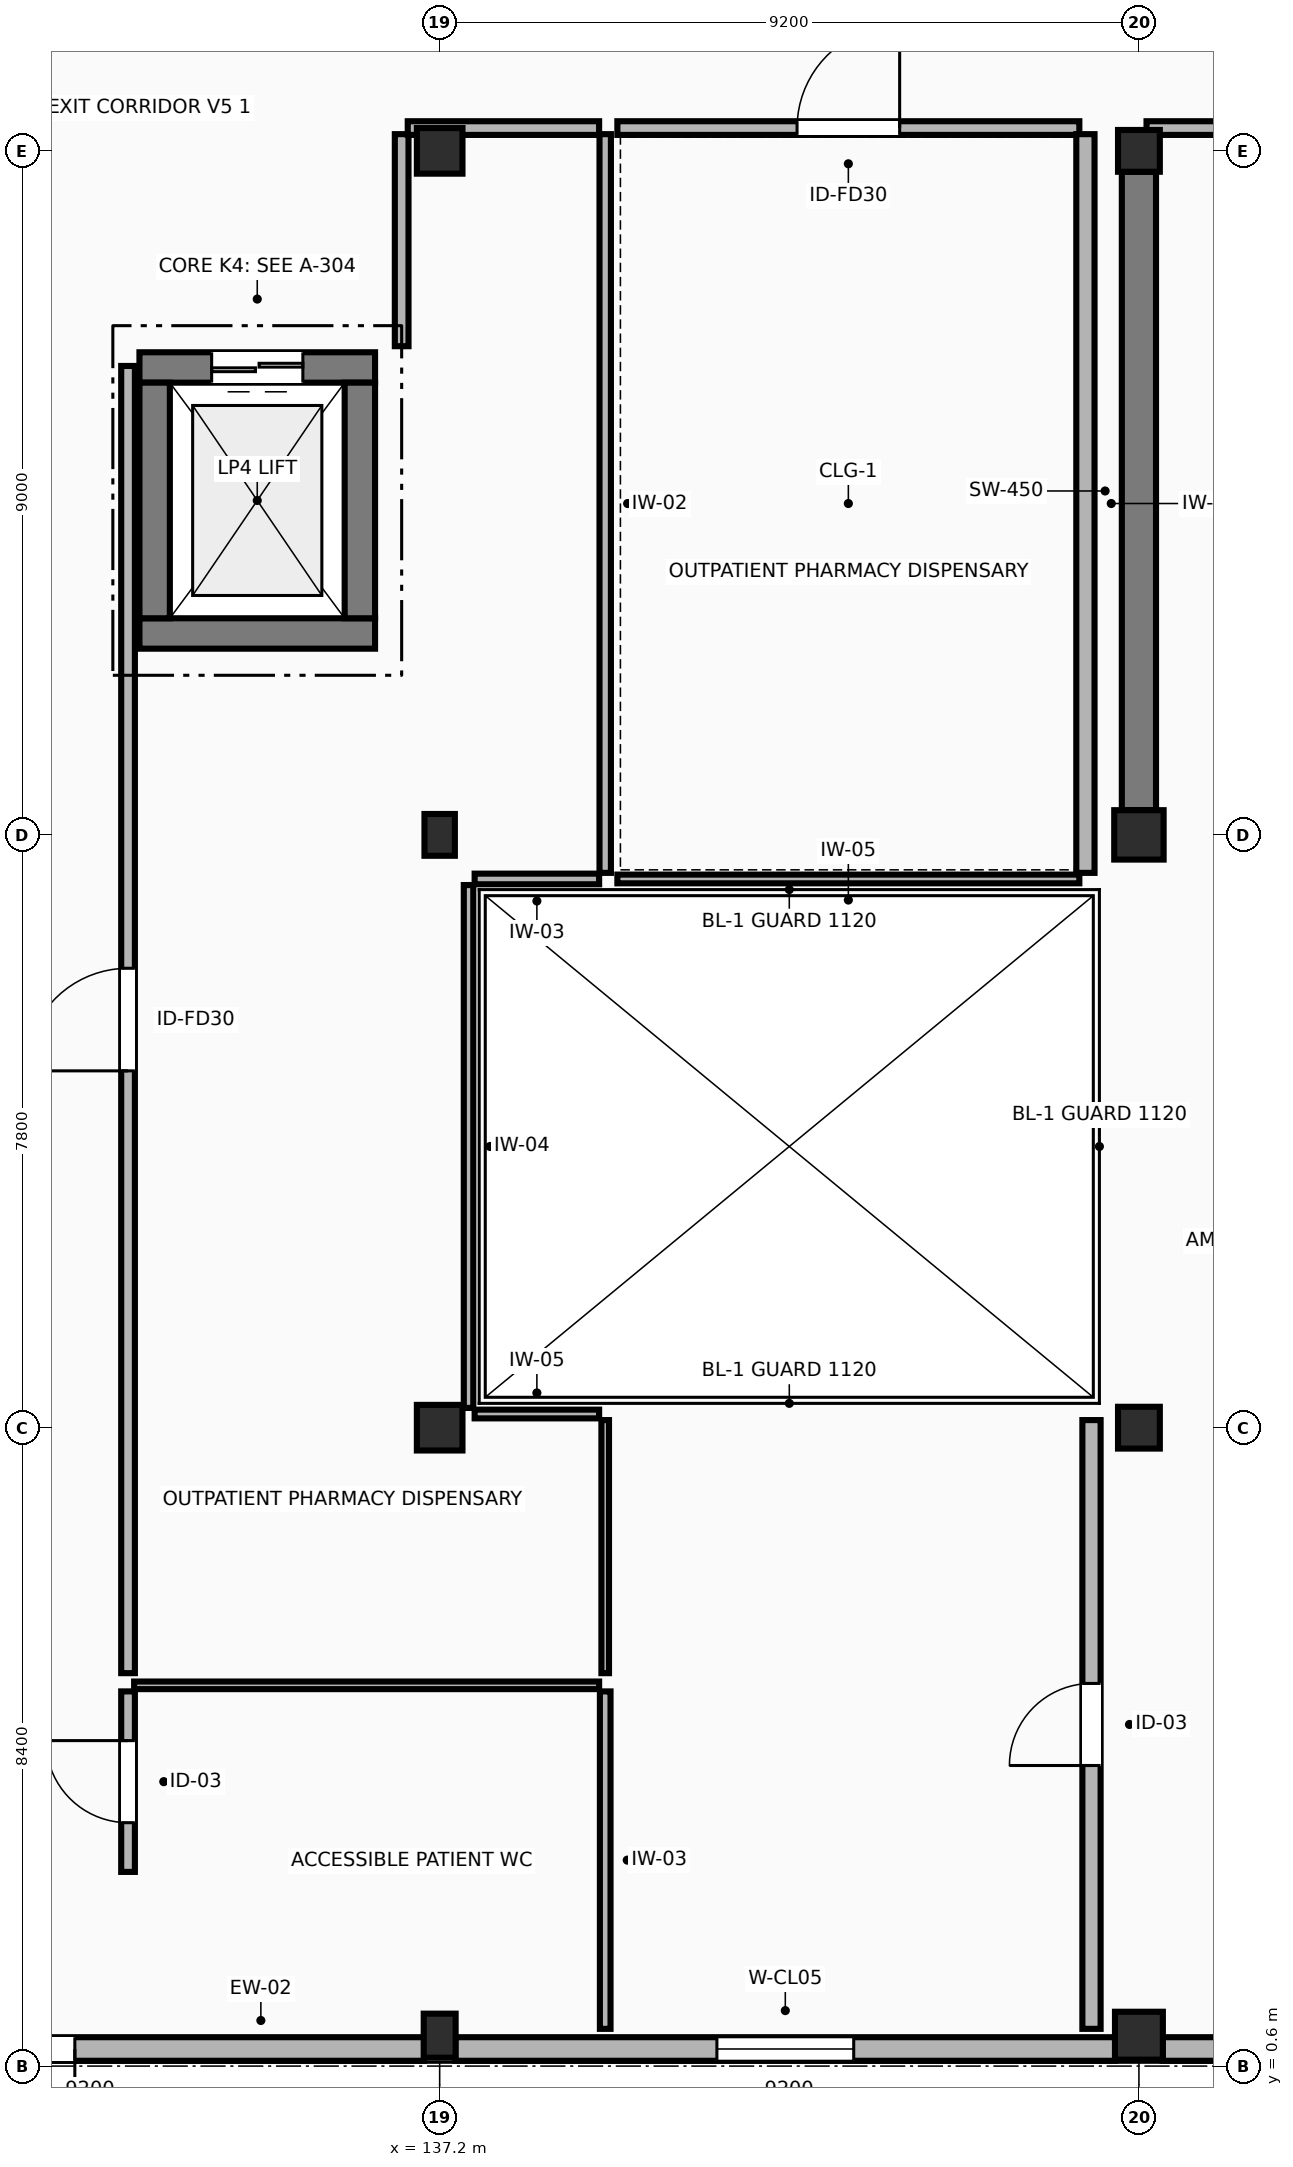
"""IFC4 building model, lengths in metres.
Left out: names, types, materials, properties, quantities, classifications, styles, units other than length and angle.
Written with IfcOpenShell. Run it as: python <this file> out.ifc"""

import sys

from ifc_helpers import new_model, si_unit, direction, frame, frame_2d, origin, origin_2d, place, context, subcontext, project, spatial, rectangle, extrude, element, fill, save


model = new_model("IFC4")
c1 = context("Model", 3, precision=1e-05, world=origin(), true_north=direction((0.0, 1.0)))
c2 = subcontext(c1, "Body", "Model", "MODEL_VIEW")
j1 = project(units=[si_unit("LENGTHUNIT", "METRE"), si_unit("PLANEANGLEUNIT", "RADIAN")], contexts=[c1])
p1 = place(None, origin())
s1 = spatial("IfcSite", under=j1, at=p1, CompositionType="ELEMENT")
p2 = place(p1, origin())
s2 = spatial("IfcBuilding", under=s1, at=p2, CompositionType="ELEMENT")
p3 = place(p2, origin())
s3 = spatial("IfcBuildingStorey", under=s2, at=p3, CompositionType="ELEMENT", Elevation=0.0)
p4 = place(p3, frame((137.2, 1.0, -1.75), z_axis=(0.0, 0.0, 1.0), x_axis=(1.0, 0.0, 0.0)))
e1 = element("IfcColumn", 1, at=p4, inside=s3, PredefinedType="COLUMN", context=c2, shape_type="SweptSolid", body=[
    extrude(rectangle(XDim=0.42, YDim=0.58, at=origin_2d()), origin(), (0.0, 0.0, 1.0), 7.15),
])
p5 = place(p3, frame((137.2, 9.0, -1.75), z_axis=(0.0, 0.0, 1.0), x_axis=(1.0, 0.0, 0.0)))
e2 = element("IfcColumn", 2, at=p5, inside=s3, PredefinedType="COLUMN", context=c2, shape_type="SweptSolid", body=[
    extrude(rectangle(XDim=0.6, YDim=0.6, at=origin_2d()), origin(), (0.0, 0.0, 1.0), 7.15),
])
p6 = place(p3, frame((137.2, 16.8, 0.0), z_axis=(0.0, 0.0, 1.0), x_axis=(1.0, 0.0, 0.0)))
e3 = element("IfcColumn", 3, at=p6, inside=s3, PredefinedType="COLUMN", context=c2, shape_type="SweptSolid", body=[
    extrude(rectangle(XDim=0.4, YDim=0.55, at=origin_2d()), origin(), (0.0, 0.0, 1.0), 5.4),
])
p7 = place(p3, frame((137.2, 25.8, 0.0), z_axis=(0.0, 0.0, 1.0), x_axis=(1.0, 0.0, 0.0)))
e4 = element("IfcColumn", 4, at=p7, inside=s3, PredefinedType="COLUMN", context=c2, shape_type="SweptSolid", body=[
    extrude(rectangle(XDim=0.6, YDim=0.6, at=origin_2d()), origin(), (0.0, 0.0, 1.0), 5.4),
])
p8 = place(p3, frame((146.4, 1.0, -1.75), z_axis=(0.0, 0.0, 1.0), x_axis=(1.0, 0.0, 0.0)))
e5 = element("IfcColumn", 5, at=p8, inside=s3, PredefinedType="COLUMN", context=c2, shape_type="SweptSolid", body=[
    extrude(rectangle(XDim=0.63, YDim=0.63, at=origin_2d()), origin(), (0.0, 0.0, 1.0), 7.15),
])
p9 = place(p3, frame((146.4, 9.0, -1.75), z_axis=(0.0, 0.0, 1.0), x_axis=(1.0, 0.0, 0.0)))
e6 = element("IfcColumn", 6, at=p9, inside=s3, PredefinedType="COLUMN", context=c2, shape_type="SweptSolid", body=[
    extrude(rectangle(XDim=0.55, YDim=0.55, at=origin_2d()), origin(), (0.0, 0.0, 1.0), 7.15),
])
p10 = place(p3, frame((146.4, 16.8, 0.0), z_axis=(0.0, 0.0, 1.0), x_axis=(1.0, 0.0, 0.0)))
e7 = element("IfcColumn", 7, at=p10, inside=s3, PredefinedType="COLUMN", context=c2, shape_type="SweptSolid", body=[
    extrude(rectangle(XDim=0.65, YDim=0.65, at=origin_2d()), origin(), (0.0, 0.0, 1.0), 5.4),
])
p11 = place(p3, frame((146.4, 25.8, 0.0), z_axis=(0.0, 0.0, 1.0), x_axis=(1.0, 0.0, 0.0)))
e8 = element("IfcColumn", 8, at=p11, inside=s3, PredefinedType="COLUMN", context=c2, shape_type="SweptSolid", body=[
    extrude(rectangle(XDim=0.55, YDim=0.55, at=origin_2d()), origin(), (0.0, 0.0, 1.0), 5.4),
])
p12 = place(p3, frame((128.26, 0.825, 0.0), z_axis=(0.0, 0.0, 1.0), x_axis=(1.0, 0.0, 0.0)))
e9 = element("IfcWall", 9, at=p12, inside=s3, PredefinedType="STANDARD", context=c2, shape_type="SweptSolid", body=[
    extrude(rectangle(XDim=8.735, YDim=0.31, at=frame_2d((4.368, 0.0))), origin(), (0.0, 0.0, 1.0), 4.42),
])
p13 = place(p12, frame((2.34, 0.0, 0.0)))
e10 = element("IfcOpeningElement", 10, at=p13, cuts=e9, PredefinedType="OPENING", context=c2, shape_type="SweptSolid", body=[
    extrude(rectangle(XDim=1.8, YDim=2.3, at=frame_2d((0.9, 1.15))), frame((0.0, 0.165, 0.0), z_axis=(0.0, -1.0, 0.0), x_axis=(1.0, 0.0, 0.0)), (0.0, 0.0, 1.0), 0.33),
])
p14 = place(p3, frame((137.405, 0.825, 0.0), z_axis=(0.0, 0.0, 1.0), x_axis=(1.0, 0.0, 0.0)))
e11 = element("IfcWall", 11, at=p14, inside=s3, PredefinedType="STANDARD", context=c2, shape_type="SweptSolid", body=[
    extrude(rectangle(XDim=8.685, YDim=0.31, at=frame_2d((4.343, 0.0))), origin(), (0.0, 0.0, 1.0), 4.42),
])
p15 = place(p14, frame((3.442, 0.0, 0.95)))
e12 = element("IfcOpeningElement", 12, at=p15, cuts=e11, PredefinedType="OPENING", context=c2, shape_type="SweptSolid", body=[
    extrude(rectangle(XDim=1.8, YDim=1.5, at=frame_2d((0.9, 0.75))), frame((0.0, 0.165, 0.0), z_axis=(0.0, -1.0, 0.0), x_axis=(1.0, 0.0, 0.0)), (0.0, 0.0, 1.0), 0.33),
])
p16 = place(p3, frame((146.71, 0.825, 0.0), z_axis=(0.0, 0.0, 1.0), x_axis=(1.0, 0.0, 0.0)))
e13 = element("IfcWall", 13, at=p16, inside=s3, PredefinedType="STANDARD", context=c2, shape_type="SweptSolid", body=[
    extrude(rectangle(XDim=8.805, YDim=0.31, at=frame_2d((4.402, 0.0))), origin(), (0.0, 0.0, 1.0), 4.42),
])
p17 = place(p16, frame((5.89, 0.0, 0.0)))
e14 = element("IfcOpeningElement", 14, at=p17, cuts=e13, PredefinedType="OPENING", context=c2, shape_type="SweptSolid", body=[
    extrude(rectangle(XDim=2.0, YDim=2.4, at=frame_2d((1.0, 1.2))), frame((0.0, 0.165, 0.0), z_axis=(0.0, -1.0, 0.0), x_axis=(1.0, 0.0, 0.0)), (0.0, 0.0, 1.0), 0.33),
])
p18 = place(p3, frame((133.25, 19.45, 0.0), z_axis=(0.0, 0.0, 1.0), x_axis=(1.0, 0.0, 0.0)))
e15 = element("IfcWall", 15, at=p18, inside=s3, PredefinedType="SHEAR", context=c2, shape_type="SweptSolid", body=[
    extrude(rectangle(XDim=3.1, YDim=0.4, at=frame_2d((1.55, 0.0))), origin(), (0.0, 0.0, 1.0), 5.4),
])
p19 = place(p3, frame((136.35, 22.95, 0.0), z_axis=(0.0, 0.0, 1.0), x_axis=(-1.0, 0.0, 0.0)))
e16 = element("IfcWall", 16, at=p19, inside=s3, PredefinedType="SHEAR", context=c2, shape_type="SweptSolid", body=[
    extrude(rectangle(XDim=3.1, YDim=0.4, at=frame_2d((1.55, 0.0))), origin(), (0.0, 0.0, 1.0), 5.4),
])
p20 = place(p19, frame((0.95, 0.0, 0.0)))
e17 = element("IfcOpeningElement", 17, at=p20, cuts=e16, PredefinedType="OPENING", context=c2, shape_type="SweptSolid", body=[
    extrude(rectangle(XDim=1.2, YDim=2.2, at=frame_2d((0.6, 1.1))), frame((0.0, 0.21, 0.0), z_axis=(0.0, -1.0, 0.0), x_axis=(1.0, 0.0, 0.0)), (0.0, 0.0, 1.0), 0.42),
])
for number, where, z_axis, x_axis in (
    (18, (133.45, 19.65, 0.0), (0.0, 0.0, 1.0), (0.0, 1.0, 0.0)),
    (19, (136.15, 22.75, 0.0), (0.0, 0.0, 1.0), (0.0, -1.0, 0.0)),
):
    element("IfcWall", number, at=place(p3, frame(where, z_axis=z_axis, x_axis=x_axis)), inside=s3, PredefinedType="SHEAR", context=c2, shape_type="SweptSolid", body=[
        extrude(rectangle(XDim=3.1, YDim=0.4, at=frame_2d((1.55, 0.0))), origin(), (0.0, 0.0, 1.0), 5.4),
    ])
p21 = place(p3, frame((146.4, 17.125, 0.0), z_axis=(0.0, 0.0, 1.0), x_axis=(0.0, 1.0, 0.0)))
e20 = element("IfcWall", 20, at=p21, inside=s3, PredefinedType="SHEAR", context=c2, shape_type="SweptSolid", body=[
    extrude(rectangle(XDim=8.4, YDim=0.45, at=frame_2d((4.2, 0.0))), origin(), (0.0, 0.0, 1.0), 5.1),
])
p22 = place(p3, frame((139.378, 5.53, 0.0), z_axis=(0.0, 0.0, 1.0), x_axis=(0.0, -1.0, 0.0)))
e21 = element("IfcWall", 21, at=p22, inside=s3, PredefinedType="PARTITIONING", context=c2, shape_type="SweptSolid", body=[
    extrude(rectangle(XDim=4.44, YDim=0.14, at=frame_2d((2.22, 0.0))), origin(), (0.0, 0.0, 1.0), 5.1),
])
p23 = place(p3, frame((133.1, 3.155, 0.0), z_axis=(0.0, 0.0, 1.0), x_axis=(0.0, 1.0, 0.0)))
e22 = element("IfcWall", 22, at=p23, inside=s3, PredefinedType="PARTITIONING", context=c2, shape_type="SweptSolid", body=[
    extrude(rectangle(XDim=2.375, YDim=0.18, at=frame_2d((1.188, 0.0))), origin(), (0.0, 0.0, 1.0), 5.1),
])
p24 = place(p23, frame((0.647, 0.0, 0.0)))
e23 = element("IfcOpeningElement", 23, at=p24, cuts=e22, PredefinedType="OPENING", context=c2, shape_type="SweptSolid", body=[
    extrude(rectangle(XDim=1.08, YDim=2.2, at=frame_2d((0.54, 1.1))), frame((0.0, 0.1, 0.0), z_axis=(0.0, -1.0, 0.0), x_axis=(1.0, 0.0, 0.0)), (0.0, 0.0, 1.0), 0.2),
])
p25 = place(p3, frame((133.18, 5.61, 0.0), z_axis=(0.0, 0.0, 1.0), x_axis=(1.0, 0.0, 0.0)))
e24 = element("IfcWall", 24, at=p25, inside=s3, PredefinedType="PARTITIONING", context=c2, shape_type="SweptSolid", body=[
    extrude(rectangle(XDim=6.118, YDim=0.1, at=frame_2d((3.059, 0.0))), origin(), (0.0, 0.0, 1.0), 5.1),
])
p26 = place(p3, frame((136.7, 23.23, 0.0), z_axis=(0.0, 0.0, 1.0), x_axis=(0.0, 1.0, 0.0)))
e25 = element("IfcWall", 25, at=p26, inside=s3, PredefinedType="PARTITIONING", context=c2, shape_type="SweptSolid", body=[
    extrude(rectangle(XDim=2.79, YDim=0.18, at=frame_2d((1.395, 0.0))), origin(), (0.0, 0.0, 1.0), 4.585),
])
p27 = place(p3, frame((136.78, 26.1, 0.0), z_axis=(0.0, 0.0, 1.0), x_axis=(1.0, 0.0, 0.0)))
e26 = element("IfcWall", 26, at=p27, inside=s3, PredefinedType="PARTITIONING", context=c2, shape_type="SweptSolid", body=[
    extrude(rectangle(XDim=2.518, YDim=0.18, at=frame_2d((1.259, 0.0))), origin(), (0.0, 0.0, 1.0), 4.435),
])
p28 = place(p3, frame((139.378, 26.02, 0.0), z_axis=(0.0, 0.0, 1.0), x_axis=(0.0, -1.0, 0.0)))
e27 = element("IfcWall", 27, at=p28, inside=s3, PredefinedType="PARTITIONING", context=c2, shape_type="SweptSolid", body=[
    extrude(rectangle(XDim=9.72, YDim=0.15, at=frame_2d((4.86, 0.0))), origin(), (0.0, 0.0, 1.0), 5.1),
])
p29 = place(p3, frame((139.298, 16.22, 0.0), z_axis=(0.0, 0.0, 1.0), x_axis=(-1.0, 0.0, 0.0)))
e28 = element("IfcWall", 28, at=p29, inside=s3, PredefinedType="PARTITIONING", context=c2, shape_type="SweptSolid", body=[
    extrude(rectangle(XDim=1.638, YDim=0.14, at=frame_2d((0.819, 0.0))), origin(), (0.0, 0.0, 1.0), 5.1),
])
p30 = place(p3, frame((137.58, 16.14, 0.0), z_axis=(0.0, 0.0, 1.0), x_axis=(0.0, -1.0, 0.0)))
e29 = element("IfcWall", 29, at=p30, inside=s3, PredefinedType="PARTITIONING", context=c2, shape_type="SweptSolid", body=[
    extrude(rectangle(XDim=6.88, YDim=0.125, at=frame_2d((3.44, 0.0))), origin(), (0.0, 0.0, 1.0), 4.61),
])
p31 = place(p3, frame((137.66, 9.18, 0.0), z_axis=(0.0, 0.0, 1.0), x_axis=(1.0, 0.0, 0.0)))
e30 = element("IfcWall", 30, at=p31, inside=s3, PredefinedType="PARTITIONING", context=c2, shape_type="SweptSolid", body=[
    extrude(rectangle(XDim=1.638, YDim=0.115, at=frame_2d((0.819, 0.0))), origin(), (0.0, 0.0, 1.0), 4.46),
])
p32 = place(p3, frame((139.378, 9.1, 0.0), z_axis=(0.0, 0.0, 1.0), x_axis=(0.0, -1.0, 0.0)))
e31 = element("IfcWall", 31, at=p32, inside=s3, PredefinedType="PARTITIONING", context=c2, shape_type="SweptSolid", body=[
    extrude(rectangle(XDim=3.33, YDim=0.1, at=frame_2d((1.665, 0.0))), origin(), (0.0, 0.0, 1.0), 5.1),
])
p33 = place(p3, frame((133.1, 5.77, 0.0), z_axis=(0.0, 0.0, 1.0), x_axis=(0.0, 1.0, 0.0)))
e32 = element("IfcWall", 32, at=p33, inside=s3, PredefinedType="PARTITIONING", context=c2, shape_type="SweptSolid", body=[
    extrude(rectangle(XDim=17.2, YDim=0.18, at=frame_2d((8.6, 0.0))), origin(), (0.0, 0.0, 1.0), 5.1),
])
p34 = place(p33, frame((7.925, 0.0, 0.0)))
e33 = element("IfcOpeningElement", 33, at=p34, cuts=e32, PredefinedType="OPENING", context=c2, shape_type="SweptSolid", body=[
    extrude(rectangle(XDim=1.35, YDim=2.2, at=frame_2d((0.675, 1.1))), frame((0.0, 0.1, 0.0), z_axis=(0.0, -1.0, 0.0), x_axis=(1.0, 0.0, 0.0)), (0.0, 0.0, 1.0), 0.2),
])
p35 = place(p3, frame((145.616, 16.22, 0.0), z_axis=(0.0, 0.0, 1.0), x_axis=(-1.0, 0.0, 0.0)))
e34 = element("IfcWall", 34, at=p35, inside=s3, PredefinedType="PARTITIONING", context=c2, shape_type="SweptSolid", body=[
    extrude(rectangle(XDim=6.078, YDim=0.115, at=frame_2d((3.039, 0.0))), origin(), (0.0, 0.0, 1.0), 5.1),
])
p36 = place(p3, frame((139.538, 26.1, 0.0), z_axis=(0.0, 0.0, 1.0), x_axis=(1.0, 0.0, 0.0)))
e35 = element("IfcWall", 35, at=p36, inside=s3, PredefinedType="PARTITIONING", context=c2, shape_type="SweptSolid", body=[
    extrude(rectangle(XDim=6.078, YDim=0.18, at=frame_2d((3.039, 0.0))), origin(), (0.0, 0.0, 1.0), 4.435),
])
p37 = place(p36, frame((2.364, 0.0, 0.0)))
e36 = element("IfcOpeningElement", 36, at=p37, cuts=e35, PredefinedType="OPENING", context=c2, shape_type="SweptSolid", body=[
    extrude(rectangle(XDim=1.35, YDim=2.2, at=frame_2d((0.675, 1.1))), frame((0.0, 0.1, 0.0), z_axis=(0.0, -1.0, 0.0), x_axis=(1.0, 0.0, 0.0)), (0.0, 0.0, 1.0), 0.2),
])
p38 = place(p3, frame((145.696, 26.02, 0.0), z_axis=(0.0, 0.0, 1.0), x_axis=(0.0, -1.0, 0.0)))
e37 = element("IfcWall", 37, at=p38, inside=s3, PredefinedType="PARTITIONING", context=c2, shape_type="SweptSolid", body=[
    extrude(rectangle(XDim=9.72, YDim=0.24, at=frame_2d((4.86, 0.0))), origin(), (0.0, 0.0, 1.0), 5.1),
])
p39 = place(p3, frame((145.776, 1.09, 0.0), z_axis=(0.0, 0.0, 1.0), x_axis=(0.0, 1.0, 0.0)))
e38 = element("IfcWall", 38, at=p39, inside=s3, PredefinedType="PARTITIONING", context=c2, shape_type="SweptSolid", body=[
    extrude(rectangle(XDim=8.01, YDim=0.24, at=frame_2d((4.005, 0.0))), origin(), (0.0, 0.0, 1.0), 5.1),
])
p40 = place(p39, frame((3.465, 0.0, 0.0)))
e39 = element("IfcOpeningElement", 39, at=p40, cuts=e38, PredefinedType="OPENING", context=c2, shape_type="SweptSolid", body=[
    extrude(rectangle(XDim=1.08, YDim=2.2, at=frame_2d((0.54, 1.1))), frame((0.0, 0.13, 0.0), z_axis=(0.0, -1.0, 0.0), x_axis=(1.0, 0.0, 0.0)), (0.0, 0.0, 1.0), 0.26),
])
p41 = place(p3, frame((146.5, 26.1, 0.0), z_axis=(0.0, 0.0, 1.0), x_axis=(1.0, 0.0, 0.0)))
e40 = element("IfcWall", 40, at=p41, inside=s3, PredefinedType="PARTITIONING", context=c2, shape_type="SweptSolid", body=[
    extrude(rectangle(XDim=5.434, YDim=0.18, at=frame_2d((2.717, 0.0))), origin(), (0.0, 0.0, 1.0), 4.435),
])
p42 = place(p41, frame((2.157, 0.0, 0.0)))
e41 = element("IfcOpeningElement", 41, at=p42, cuts=e40, PredefinedType="OPENING", context=c2, shape_type="SweptSolid", body=[
    extrude(rectangle(XDim=1.12, YDim=2.16, at=frame_2d((0.56, 1.08))), frame((0.0, 0.1, 0.0), z_axis=(0.0, -1.0, 0.0), x_axis=(1.0, 0.0, 0.0)), (0.0, 0.0, 1.0), 0.2),
])
p43 = place(p13, frame((1.8, 0.0, 0.0), z_axis=(0.0, 0.0, 1.0), x_axis=(-1.0, 0.0, 0.0)))
e42 = element("IfcDoor", 42, at=p43, inside=s3, OperationType="DOUBLE_DOOR_SINGLE_SWING", PredefinedType="DOOR", context=c2, shape_type="SweptSolid", body=[
    extrude(rectangle(XDim=1.8, YDim=2.3, at=frame_2d((0.9, 1.15))), frame((0.0, 0.025, 0.0), z_axis=(0.0, -1.0, 0.0), x_axis=(1.0, 0.0, 0.0)), (0.0, 0.0, 1.0), 0.05),
])
fill(e10, e42)
p44 = place(p15, origin())
e43 = element("IfcWindow", 43, at=p44, inside=s3, PartitioningType="SINGLE_PANEL", PredefinedType="WINDOW", context=c2, shape_type="SweptSolid", body=[
    extrude(rectangle(XDim=1.8, YDim=1.5, at=frame_2d((0.9, 0.75))), frame((0.0, 0.03, 0.0), z_axis=(0.0, -1.0, 0.0), x_axis=(1.0, 0.0, 0.0)), (0.0, 0.0, 1.0), 0.06),
])
fill(e12, e43)
p45 = place(p20, origin())
e44 = element("IfcDoor", 44, at=p45, inside=s3, OperationType="DOUBLE_DOOR_SLIDING", PredefinedType="DOOR", context=c2, shape_type="SweptSolid", body=[
    extrude(rectangle(XDim=1.2, YDim=2.2, at=frame_2d((0.6, 1.1))), frame((0.0, 0.025, 0.0), z_axis=(0.0, -1.0, 0.0), x_axis=(1.0, 0.0, 0.0)), (0.0, 0.0, 1.0), 0.05),
])
fill(e17, e44)
p46 = place(p24, origin())
e45 = element("IfcDoor", 45, at=p46, inside=s3, OperationType="SINGLE_SWING_RIGHT", PredefinedType="DOOR", context=c2, shape_type="SweptSolid", body=[
    extrude(rectangle(XDim=1.08, YDim=2.2, at=frame_2d((0.54, 1.1))), frame((0.0, 0.025, 0.0), z_axis=(0.0, -1.0, 0.0), x_axis=(1.0, 0.0, 0.0)), (0.0, 0.0, 1.0), 0.05),
])
fill(e23, e45)
p47 = place(p34, origin())
e46 = element("IfcDoor", 46, at=p47, inside=s3, OperationType="SINGLE_SWING_LEFT", PredefinedType="DOOR", context=c2, shape_type="SweptSolid", body=[
    extrude(rectangle(XDim=1.35, YDim=2.2, at=frame_2d((0.675, 1.1))), frame((0.0, 0.025, 0.0), z_axis=(0.0, -1.0, 0.0), x_axis=(1.0, 0.0, 0.0)), (0.0, 0.0, 1.0), 0.05),
])
fill(e33, e46)
p48 = place(p37, origin())
e47 = element("IfcDoor", 47, at=p48, inside=s3, OperationType="SINGLE_SWING_RIGHT", PredefinedType="DOOR", context=c2, shape_type="SweptSolid", body=[
    extrude(rectangle(XDim=1.35, YDim=2.2, at=frame_2d((0.675, 1.1))), frame((0.0, 0.025, 0.0), z_axis=(0.0, -1.0, 0.0), x_axis=(1.0, 0.0, 0.0)), (0.0, 0.0, 1.0), 0.05),
])
fill(e36, e47)
p49 = place(p40, origin())
e48 = element("IfcDoor", 48, at=p49, inside=s3, OperationType="SINGLE_SWING_LEFT", PredefinedType="DOOR", context=c2, shape_type="SweptSolid", body=[
    extrude(rectangle(XDim=1.08, YDim=2.2, at=frame_2d((0.54, 1.1))), frame((0.0, 0.025, 0.0), z_axis=(0.0, -1.0, 0.0), x_axis=(1.0, 0.0, 0.0)), (0.0, 0.0, 1.0), 0.05),
])
fill(e39, e48)
save(model, sys.argv[1])
